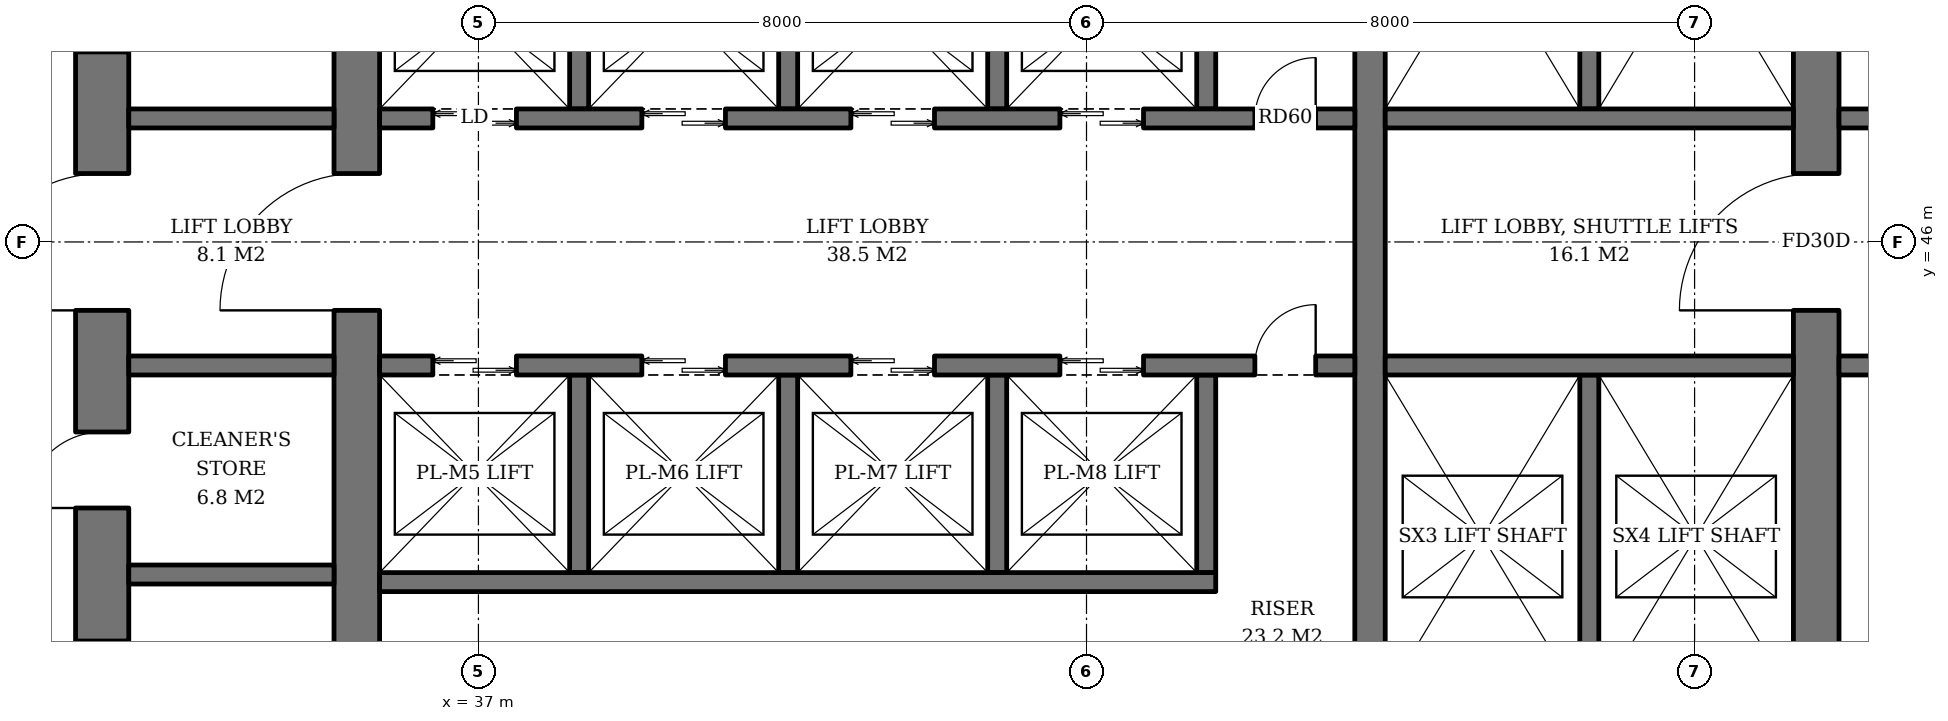
"""IFC4 building model, lengths in metres.
Left out: names, types, materials, properties, quantities, classifications, styles, units other than length and angle.
Written with IfcOpenShell. Run it as: python <this file> out.ifc"""

import sys

from ifc_helpers import new_model, si_unit, direction, frame, frame_2d, origin, place, context, subcontext, project, spatial, rectangle, extrude, element, fill, save


model = new_model("IFC4")
c1 = context("Model", 3, precision=1e-05, world=origin(), true_north=direction((0.0, 1.0)))
c2 = subcontext(c1, "Body", "Model", "MODEL_VIEW")
j1 = project(units=[si_unit("LENGTHUNIT", "METRE"), si_unit("PLANEANGLEUNIT", "RADIAN")], contexts=[c1])
p1 = place(None, origin())
s1 = spatial("IfcSite", under=j1, at=p1, CompositionType="ELEMENT")
p2 = place(p1, origin())
s2 = spatial("IfcBuilding", under=s1, at=p2, CompositionType="ELEMENT")
p3 = place(p2, frame((0.0, 0.0, 135.0)))
s3 = spatial("IfcBuildingStorey", under=s2, at=p3, CompositionType="ELEMENT", Elevation=135.0)
p4 = place(p3, frame((35.4, 36.7, 0.0), z_axis=(0.0, 0.0, 1.0), x_axis=(0.0, 1.0, 0.0)))
e1 = element("IfcWall", 1, at=p4, inside=s3, PredefinedType="SHEAR", context=c2, shape_type="SweptSolid", body=[
    extrude(rectangle(XDim=18.6, YDim=0.6, at=frame_2d((9.3, 0.0))), origin(), (0.0, 0.0, 1.0), 3.8),
])
p5 = place(p4, frame((8.4, 0.0, 0.0)))
e2 = element("IfcOpeningElement", 2, at=p5, cuts=e1, PredefinedType="OPENING", context=c2, shape_type="SweptSolid", body=[
    extrude(rectangle(XDim=1.8, YDim=2.4, at=frame_2d((0.9, 1.2))), frame((0.0, 0.31, 0.0), z_axis=(0.0, -1.0, 0.0), x_axis=(1.0, 0.0, 0.0)), (0.0, 0.0, 1.0), 0.62),
])
p6 = place(p3, frame((54.6, 36.7, 0.0), z_axis=(0.0, 0.0, 1.0), x_axis=(0.0, 1.0, 0.0)))
e3 = element("IfcWall", 3, at=p6, inside=s3, PredefinedType="SHEAR", context=c2, shape_type="SweptSolid", body=[
    extrude(rectangle(XDim=18.6, YDim=0.6, at=frame_2d((9.3, 0.0))), origin(), (0.0, 0.0, 1.0), 3.8),
])
p7 = place(p6, frame((8.4, 0.0, 0.0)))
e4 = element("IfcOpeningElement", 4, at=p7, cuts=e3, PredefinedType="OPENING", context=c2, shape_type="SweptSolid", body=[
    extrude(rectangle(XDim=1.8, YDim=2.4, at=frame_2d((0.9, 1.2))), frame((0.0, 0.31, 0.0), z_axis=(0.0, -1.0, 0.0), x_axis=(1.0, 0.0, 0.0)), (0.0, 0.0, 1.0), 0.62),
])
p8 = place(p3, frame((32.05, 33.4, 0.0), z_axis=(0.0, 0.0, 1.0), x_axis=(0.0, 1.0, 0.0)))
e5 = element("IfcWall", 5, at=p8, inside=s3, PredefinedType="SHEAR", context=c2, shape_type="SweptSolid", body=[
    extrude(rectangle(XDim=25.2, YDim=0.7, at=frame_2d((12.6, 0.0))), origin(), (0.0, 0.0, 1.0), 3.8),
])
p9 = place(p8, frame((11.7, 0.0, 0.0)))
e6 = element("IfcOpeningElement", 6, at=p9, cuts=e5, PredefinedType="OPENING", context=c2, shape_type="SweptSolid", body=[
    extrude(rectangle(XDim=1.8, YDim=2.4, at=frame_2d((0.9, 1.2))), frame((0.0, 0.36, 0.0), z_axis=(0.0, -1.0, 0.0), x_axis=(1.0, 0.0, 0.0)), (0.0, 0.0, 1.0), 0.72),
])
p10 = place(p8, frame((3.6, 0.0, 0.0)))
e7 = element("IfcOpeningElement", 7, at=p10, cuts=e5, PredefinedType="OPENING", context=c2, shape_type="SweptSolid", body=[
    extrude(rectangle(XDim=1.0, YDim=2.1, at=frame_2d((0.5, 1.05))), frame((0.0, 0.36, 0.0), z_axis=(0.0, -1.0, 0.0), x_axis=(1.0, 0.0, 0.0)), (0.0, 0.0, 1.0), 0.72),
])
p11 = place(p8, frame((6.35, 0.0, 0.0)))
e8 = element("IfcOpeningElement", 8, at=p11, cuts=e5, PredefinedType="OPENING", context=c2, shape_type="SweptSolid", body=[
    extrude(rectangle(XDim=1.0, YDim=2.1, at=frame_2d((0.5, 1.05))), frame((0.0, 0.36, 0.0), z_axis=(0.0, -1.0, 0.0), x_axis=(1.0, 0.0, 0.0)), (0.0, 0.0, 1.0), 0.72),
])
p12 = place(p8, frame((9.1, 0.0, 0.0)))
e9 = element("IfcOpeningElement", 9, at=p12, cuts=e5, PredefinedType="OPENING", context=c2, shape_type="SweptSolid", body=[
    extrude(rectangle(XDim=1.0, YDim=2.1, at=frame_2d((0.5, 1.05))), frame((0.0, 0.36, 0.0), z_axis=(0.0, -1.0, 0.0), x_axis=(1.0, 0.0, 0.0)), (0.0, 0.0, 1.0), 0.72),
])
p13 = place(p8, frame((15.1, 0.0, 0.0)))
e10 = element("IfcOpeningElement", 10, at=p13, cuts=e5, PredefinedType="OPENING", context=c2, shape_type="SweptSolid", body=[
    extrude(rectangle(XDim=1.0, YDim=2.1, at=frame_2d((0.5, 1.05))), frame((0.0, 0.36, 0.0), z_axis=(0.0, -1.0, 0.0), x_axis=(1.0, 0.0, 0.0)), (0.0, 0.0, 1.0), 0.72),
])
p14 = place(p8, frame((17.85, 0.0, 0.0)))
e11 = element("IfcOpeningElement", 11, at=p14, cuts=e5, PredefinedType="OPENING", context=c2, shape_type="SweptSolid", body=[
    extrude(rectangle(XDim=1.0, YDim=2.1, at=frame_2d((0.5, 1.05))), frame((0.0, 0.36, 0.0), z_axis=(0.0, -1.0, 0.0), x_axis=(1.0, 0.0, 0.0)), (0.0, 0.0, 1.0), 0.72),
])
p15 = place(p3, frame((48.73, 40.0, 0.0), z_axis=(0.0, 0.0, 1.0), x_axis=(0.0, 1.0, 0.0)))
e12 = element("IfcWall", 12, at=p15, inside=s3, PredefinedType="SHEAR", context=c2, shape_type="SweptSolid", body=[
    extrude(rectangle(XDim=12.0, YDim=0.4, at=frame_2d((6.0, 0.0))), origin(), (0.0, 0.0, 1.0), 3.8),
])
for number, where, z_axis, x_axis in (
    (13, (38.325, 47.75, 0.0), (0.0, 0.0, 1.0), (0.0, 1.0, 0.0)),
    (14, (41.075, 47.75, 0.0), (0.0, 0.0, 1.0), (0.0, 1.0, 0.0)),
    (15, (43.825, 47.75, 0.0), (0.0, 0.0, 1.0), (0.0, 1.0, 0.0)),
    (16, (46.575, 47.75, 0.0), (0.0, 0.0, 1.0), (0.0, 1.0, 0.0)),
):
    element("IfcWall", number, at=place(p3, frame(where, z_axis=z_axis, x_axis=x_axis)), inside=s3, PredefinedType="SHEAR", context=c2, shape_type="SweptSolid", body=[
        extrude(rectangle(XDim=2.6, YDim=0.25, at=frame_2d((1.3, 0.0))), origin(), (0.0, 0.0, 1.0), 3.8),
    ])
p16 = place(p3, frame((35.7, 47.625, 0.0), z_axis=(0.0, 0.0, 1.0), x_axis=(1.0, 0.0, 0.0)))
e17 = element("IfcWall", 17, at=p16, inside=s3, PredefinedType="SHEAR", context=c2, shape_type="SweptSolid", body=[
    extrude(rectangle(XDim=12.83, YDim=0.25, at=frame_2d((6.415, 0.0))), origin(), (0.0, 0.0, 1.0), 3.8),
])
p17 = place(p16, frame((0.7, 0.0, 0.0)))
e18 = element("IfcOpeningElement", 18, at=p17, cuts=e17, PredefinedType="OPENING", context=c2, shape_type="SweptSolid", body=[
    extrude(rectangle(XDim=1.1, YDim=2.2, at=frame_2d((0.55, 1.1))), frame((0.0, 0.135, 0.0), z_axis=(0.0, -1.0, 0.0), x_axis=(1.0, 0.0, 0.0)), (0.0, 0.0, 1.0), 0.27),
])
p18 = place(p16, frame((3.45, 0.0, 0.0)))
e19 = element("IfcOpeningElement", 19, at=p18, cuts=e17, PredefinedType="OPENING", context=c2, shape_type="SweptSolid", body=[
    extrude(rectangle(XDim=1.1, YDim=2.2, at=frame_2d((0.55, 1.1))), frame((0.0, 0.135, 0.0), z_axis=(0.0, -1.0, 0.0), x_axis=(1.0, 0.0, 0.0)), (0.0, 0.0, 1.0), 0.27),
])
p19 = place(p16, frame((6.2, 0.0, 0.0)))
e20 = element("IfcOpeningElement", 20, at=p19, cuts=e17, PredefinedType="OPENING", context=c2, shape_type="SweptSolid", body=[
    extrude(rectangle(XDim=1.1, YDim=2.2, at=frame_2d((0.55, 1.1))), frame((0.0, 0.135, 0.0), z_axis=(0.0, -1.0, 0.0), x_axis=(1.0, 0.0, 0.0)), (0.0, 0.0, 1.0), 0.27),
])
p20 = place(p16, frame((8.95, 0.0, 0.0)))
e21 = element("IfcOpeningElement", 21, at=p20, cuts=e17, PredefinedType="OPENING", context=c2, shape_type="SweptSolid", body=[
    extrude(rectangle(XDim=1.1, YDim=2.2, at=frame_2d((0.55, 1.1))), frame((0.0, 0.135, 0.0), z_axis=(0.0, -1.0, 0.0), x_axis=(1.0, 0.0, 0.0)), (0.0, 0.0, 1.0), 0.27),
])
p21 = place(p16, frame((11.515, 0.0, 0.0)))
e22 = element("IfcOpeningElement", 22, at=p21, cuts=e17, PredefinedType="OPENING", context=c2, shape_type="SweptSolid", body=[
    extrude(rectangle(XDim=0.8, YDim=2.0, at=frame_2d((0.4, 1.0))), frame((0.0, 0.135, 0.0), z_axis=(0.0, -1.0, 0.0), x_axis=(1.0, 0.0, 0.0)), (0.0, 0.0, 1.0), 0.27),
])
for number, where, z_axis, x_axis in (
    (23, (38.325, 44.25, 0.0), (0.0, 0.0, 1.0), (0.0, -1.0, 0.0)),
    (24, (41.075, 44.25, 0.0), (0.0, 0.0, 1.0), (0.0, -1.0, 0.0)),
    (25, (43.825, 44.25, 0.0), (0.0, 0.0, 1.0), (0.0, -1.0, 0.0)),
    (26, (46.575, 44.25, 0.0), (0.0, 0.0, 1.0), (0.0, -1.0, 0.0)),
):
    element("IfcWall", number, at=place(p3, frame(where, z_axis=z_axis, x_axis=x_axis)), inside=s3, PredefinedType="SHEAR", context=c2, shape_type="SweptSolid", body=[
        extrude(rectangle(XDim=2.6, YDim=0.25, at=frame_2d((1.3, 0.0))), origin(), (0.0, 0.0, 1.0), 3.8),
    ])
p22 = place(p3, frame((35.7, 41.525, 0.0), z_axis=(0.0, 0.0, 1.0), x_axis=(1.0, 0.0, 0.0)))
e27 = element("IfcWall", 27, at=p22, inside=s3, PredefinedType="SHEAR", context=c2, shape_type="SweptSolid", body=[
    extrude(rectangle(XDim=11.0, YDim=0.25, at=frame_2d((5.5, 0.0))), origin(), (0.0, 0.0, 1.0), 3.8),
])
p23 = place(p3, frame((35.7, 44.375, 0.0), z_axis=(0.0, 0.0, 1.0), x_axis=(1.0, 0.0, 0.0)))
e28 = element("IfcWall", 28, at=p23, inside=s3, PredefinedType="SHEAR", context=c2, shape_type="SweptSolid", body=[
    extrude(rectangle(XDim=12.83, YDim=0.25, at=frame_2d((6.415, 0.0))), origin(), (0.0, 0.0, 1.0), 3.8),
])
p24 = place(p23, frame((0.7, 0.0, 0.0)))
e29 = element("IfcOpeningElement", 29, at=p24, cuts=e28, PredefinedType="OPENING", context=c2, shape_type="SweptSolid", body=[
    extrude(rectangle(XDim=1.1, YDim=2.2, at=frame_2d((0.55, 1.1))), frame((0.0, 0.135, 0.0), z_axis=(0.0, -1.0, 0.0), x_axis=(1.0, 0.0, 0.0)), (0.0, 0.0, 1.0), 0.27),
])
p25 = place(p23, frame((3.45, 0.0, 0.0)))
e30 = element("IfcOpeningElement", 30, at=p25, cuts=e28, PredefinedType="OPENING", context=c2, shape_type="SweptSolid", body=[
    extrude(rectangle(XDim=1.1, YDim=2.2, at=frame_2d((0.55, 1.1))), frame((0.0, 0.135, 0.0), z_axis=(0.0, -1.0, 0.0), x_axis=(1.0, 0.0, 0.0)), (0.0, 0.0, 1.0), 0.27),
])
p26 = place(p23, frame((6.2, 0.0, 0.0)))
e31 = element("IfcOpeningElement", 31, at=p26, cuts=e28, PredefinedType="OPENING", context=c2, shape_type="SweptSolid", body=[
    extrude(rectangle(XDim=1.1, YDim=2.2, at=frame_2d((0.55, 1.1))), frame((0.0, 0.135, 0.0), z_axis=(0.0, -1.0, 0.0), x_axis=(1.0, 0.0, 0.0)), (0.0, 0.0, 1.0), 0.27),
])
p27 = place(p23, frame((8.95, 0.0, 0.0)))
e32 = element("IfcOpeningElement", 32, at=p27, cuts=e28, PredefinedType="OPENING", context=c2, shape_type="SweptSolid", body=[
    extrude(rectangle(XDim=1.1, YDim=2.2, at=frame_2d((0.55, 1.1))), frame((0.0, 0.135, 0.0), z_axis=(0.0, -1.0, 0.0), x_axis=(1.0, 0.0, 0.0)), (0.0, 0.0, 1.0), 0.27),
])
p28 = place(p23, frame((11.515, 0.0, 0.0)))
e33 = element("IfcOpeningElement", 33, at=p28, cuts=e28, PredefinedType="OPENING", context=c2, shape_type="SweptSolid", body=[
    extrude(rectangle(XDim=0.8, YDim=2.0, at=frame_2d((0.4, 1.0))), frame((0.0, 0.135, 0.0), z_axis=(0.0, -1.0, 0.0), x_axis=(1.0, 0.0, 0.0)), (0.0, 0.0, 1.0), 0.27),
])
p29 = place(p3, frame((51.615, 47.75, 0.0), z_axis=(0.0, 0.0, 1.0), x_axis=(0.0, 1.0, 0.0)))
e34 = element("IfcWall", 34, at=p29, inside=s3, PredefinedType="SHEAR", context=c2, shape_type="SweptSolid", body=[
    extrude(rectangle(XDim=4.25, YDim=0.25, at=frame_2d((2.125, 0.0))), origin(), (0.0, 0.0, 1.0), 3.8),
])
p30 = place(p3, frame((48.93, 47.625, 0.0), z_axis=(0.0, 0.0, 1.0), x_axis=(1.0, 0.0, 0.0)))
e35 = element("IfcWall", 35, at=p30, inside=s3, PredefinedType="SHEAR", context=c2, shape_type="SweptSolid", body=[
    extrude(rectangle(XDim=5.37, YDim=0.25, at=frame_2d((2.685, 0.0))), origin(), (0.0, 0.0, 1.0), 3.8),
])
p31 = place(p3, frame((51.615, 44.25, 0.0), z_axis=(0.0, 0.0, 1.0), x_axis=(0.0, -1.0, 0.0)))
e36 = element("IfcWall", 36, at=p31, inside=s3, PredefinedType="SHEAR", context=c2, shape_type="SweptSolid", body=[
    extrude(rectangle(XDim=4.25, YDim=0.25, at=frame_2d((2.125, 0.0))), origin(), (0.0, 0.0, 1.0), 3.8),
])
p32 = place(p3, frame((48.93, 44.375, 0.0), z_axis=(0.0, 0.0, 1.0), x_axis=(1.0, 0.0, 0.0)))
e37 = element("IfcWall", 37, at=p32, inside=s3, PredefinedType="SHEAR", context=c2, shape_type="SweptSolid", body=[
    extrude(rectangle(XDim=5.37, YDim=0.25, at=frame_2d((2.685, 0.0))), origin(), (0.0, 0.0, 1.0), 3.8),
])
for number, where, z_axis, x_axis in (
    (38, (32.4, 41.625, 0.0), (0.0, 0.0, 1.0), (1.0, 0.0, 0.0)),
    (39, (32.4, 44.375, 0.0), (0.0, 0.0, 1.0), (1.0, 0.0, 0.0)),
    (40, (32.4, 47.625, 0.0), (0.0, 0.0, 1.0), (1.0, 0.0, 0.0)),
):
    element("IfcWall", number, at=place(p3, frame(where, z_axis=z_axis, x_axis=x_axis)), inside=s3, PredefinedType="SHEAR", context=c2, shape_type="SweptSolid", body=[
        extrude(rectangle(XDim=2.7, YDim=0.25, at=frame_2d((1.35, 0.0))), origin(), (0.0, 0.0, 1.0), 3.8),
    ])
for number, where, z_axis, x_axis in (
    (41, (54.9, 44.375, 0.0), (0.0, 0.0, 1.0), (1.0, 0.0, 0.0)),
    (42, (54.9, 47.625, 0.0), (0.0, 0.0, 1.0), (1.0, 0.0, 0.0)),
):
    element("IfcWall", number, at=place(p3, frame(where, z_axis=z_axis, x_axis=x_axis)), inside=s3, PredefinedType="SOLIDWALL", context=c2, shape_type="SweptSolid", body=[
        extrude(rectangle(XDim=2.7, YDim=0.25, at=frame_2d((1.35, 0.0))), origin(), (0.0, 0.0, 1.0), 3.62),
    ])
p33 = place(p17, origin())
e43 = element("IfcDoor", 43, at=p33, inside=s3, OperationType="DOUBLE_DOOR_SLIDING", PredefinedType="DOOR", context=c2, shape_type="SweptSolid", body=[
    extrude(rectangle(XDim=1.1, YDim=2.2, at=frame_2d((0.55, 1.1))), frame((0.0, 0.025, 0.0), z_axis=(0.0, -1.0, 0.0), x_axis=(1.0, 0.0, 0.0)), (0.0, 0.0, 1.0), 0.05),
])
fill(e18, e43)
p34 = place(p18, origin())
e44 = element("IfcDoor", 44, at=p34, inside=s3, OperationType="DOUBLE_DOOR_SLIDING", PredefinedType="DOOR", context=c2, shape_type="SweptSolid", body=[
    extrude(rectangle(XDim=1.1, YDim=2.2, at=frame_2d((0.55, 1.1))), frame((0.0, 0.025, 0.0), z_axis=(0.0, -1.0, 0.0), x_axis=(1.0, 0.0, 0.0)), (0.0, 0.0, 1.0), 0.05),
])
fill(e19, e44)
p35 = place(p19, origin())
e45 = element("IfcDoor", 45, at=p35, inside=s3, OperationType="DOUBLE_DOOR_SLIDING", PredefinedType="DOOR", context=c2, shape_type="SweptSolid", body=[
    extrude(rectangle(XDim=1.1, YDim=2.2, at=frame_2d((0.55, 1.1))), frame((0.0, 0.025, 0.0), z_axis=(0.0, -1.0, 0.0), x_axis=(1.0, 0.0, 0.0)), (0.0, 0.0, 1.0), 0.05),
])
fill(e20, e45)
p36 = place(p20, origin())
e46 = element("IfcDoor", 46, at=p36, inside=s3, OperationType="DOUBLE_DOOR_SLIDING", PredefinedType="DOOR", context=c2, shape_type="SweptSolid", body=[
    extrude(rectangle(XDim=1.1, YDim=2.2, at=frame_2d((0.55, 1.1))), frame((0.0, 0.025, 0.0), z_axis=(0.0, -1.0, 0.0), x_axis=(1.0, 0.0, 0.0)), (0.0, 0.0, 1.0), 0.05),
])
fill(e21, e46)
p37 = place(p21, origin())
e47 = element("IfcDoor", 47, at=p37, inside=s3, OperationType="SINGLE_SWING_RIGHT", PredefinedType="DOOR", context=c2, shape_type="SweptSolid", body=[
    extrude(rectangle(XDim=0.8, YDim=2.0, at=frame_2d((0.4, 1.0))), frame((0.0, 0.025, 0.0), z_axis=(0.0, -1.0, 0.0), x_axis=(1.0, 0.0, 0.0)), (0.0, 0.0, 1.0), 0.05),
])
fill(e22, e47)
p38 = place(p24, origin())
e48 = element("IfcDoor", 48, at=p38, inside=s3, OperationType="DOUBLE_DOOR_SLIDING", PredefinedType="DOOR", context=c2, shape_type="SweptSolid", body=[
    extrude(rectangle(XDim=1.1, YDim=2.2, at=frame_2d((0.55, 1.1))), frame((0.0, 0.025, 0.0), z_axis=(0.0, -1.0, 0.0), x_axis=(1.0, 0.0, 0.0)), (0.0, 0.0, 1.0), 0.05),
])
fill(e29, e48)
p39 = place(p25, origin())
e49 = element("IfcDoor", 49, at=p39, inside=s3, OperationType="DOUBLE_DOOR_SLIDING", PredefinedType="DOOR", context=c2, shape_type="SweptSolid", body=[
    extrude(rectangle(XDim=1.1, YDim=2.2, at=frame_2d((0.55, 1.1))), frame((0.0, 0.025, 0.0), z_axis=(0.0, -1.0, 0.0), x_axis=(1.0, 0.0, 0.0)), (0.0, 0.0, 1.0), 0.05),
])
fill(e30, e49)
p40 = place(p26, origin())
e50 = element("IfcDoor", 50, at=p40, inside=s3, OperationType="DOUBLE_DOOR_SLIDING", PredefinedType="DOOR", context=c2, shape_type="SweptSolid", body=[
    extrude(rectangle(XDim=1.1, YDim=2.2, at=frame_2d((0.55, 1.1))), frame((0.0, 0.025, 0.0), z_axis=(0.0, -1.0, 0.0), x_axis=(1.0, 0.0, 0.0)), (0.0, 0.0, 1.0), 0.05),
])
fill(e31, e50)
p41 = place(p27, origin())
e51 = element("IfcDoor", 51, at=p41, inside=s3, OperationType="DOUBLE_DOOR_SLIDING", PredefinedType="DOOR", context=c2, shape_type="SweptSolid", body=[
    extrude(rectangle(XDim=1.1, YDim=2.2, at=frame_2d((0.55, 1.1))), frame((0.0, 0.025, 0.0), z_axis=(0.0, -1.0, 0.0), x_axis=(1.0, 0.0, 0.0)), (0.0, 0.0, 1.0), 0.05),
])
fill(e32, e51)
p42 = place(p28, origin())
e52 = element("IfcDoor", 52, at=p42, inside=s3, OperationType="SINGLE_SWING_RIGHT", PredefinedType="DOOR", context=c2, shape_type="SweptSolid", body=[
    extrude(rectangle(XDim=0.8, YDim=2.0, at=frame_2d((0.4, 1.0))), frame((0.0, 0.025, 0.0), z_axis=(0.0, -1.0, 0.0), x_axis=(1.0, 0.0, 0.0)), (0.0, 0.0, 1.0), 0.05),
])
fill(e33, e52)
p43 = place(p5, origin())
e53 = element("IfcDoor", 53, at=p43, inside=s3, OperationType="DOUBLE_DOOR_SINGLE_SWING", PredefinedType="DOOR", context=c2, shape_type="SweptSolid", body=[
    extrude(rectangle(XDim=1.8, YDim=2.4, at=frame_2d((0.9, 1.2))), frame((0.0, 0.025, 0.0), z_axis=(0.0, -1.0, 0.0), x_axis=(1.0, 0.0, 0.0)), (0.0, 0.0, 1.0), 0.05),
])
fill(e2, e53)
p44 = place(p7, origin())
e54 = element("IfcDoor", 54, at=p44, inside=s3, OperationType="DOUBLE_DOOR_SINGLE_SWING", PredefinedType="DOOR", context=c2, shape_type="SweptSolid", body=[
    extrude(rectangle(XDim=1.8, YDim=2.4, at=frame_2d((0.9, 1.2))), frame((0.0, 0.025, 0.0), z_axis=(0.0, -1.0, 0.0), x_axis=(1.0, 0.0, 0.0)), (0.0, 0.0, 1.0), 0.05),
])
fill(e4, e54)
p45 = place(p9, origin())
e55 = element("IfcDoor", 55, at=p45, inside=s3, OperationType="DOUBLE_DOOR_SINGLE_SWING", PredefinedType="DOOR", context=c2, shape_type="SweptSolid", body=[
    extrude(rectangle(XDim=1.8, YDim=2.4, at=frame_2d((0.9, 1.2))), frame((0.0, 0.025, 0.0), z_axis=(0.0, -1.0, 0.0), x_axis=(1.0, 0.0, 0.0)), (0.0, 0.0, 1.0), 0.05),
])
fill(e6, e55)
p46 = place(p12, origin())
e56 = element("IfcDoor", 56, at=p46, inside=s3, OperationType="SINGLE_SWING_LEFT", PredefinedType="DOOR", context=c2, shape_type="SweptSolid", body=[
    extrude(rectangle(XDim=1.0, YDim=2.1, at=frame_2d((0.5, 1.05))), frame((0.0, -0.29, 0.0), z_axis=(0.0, -1.0, 0.0), x_axis=(1.0, 0.0, 0.0)), (0.0, 0.0, 1.0), 0.05),
])
fill(e9, e56)
save(model, sys.argv[1])
